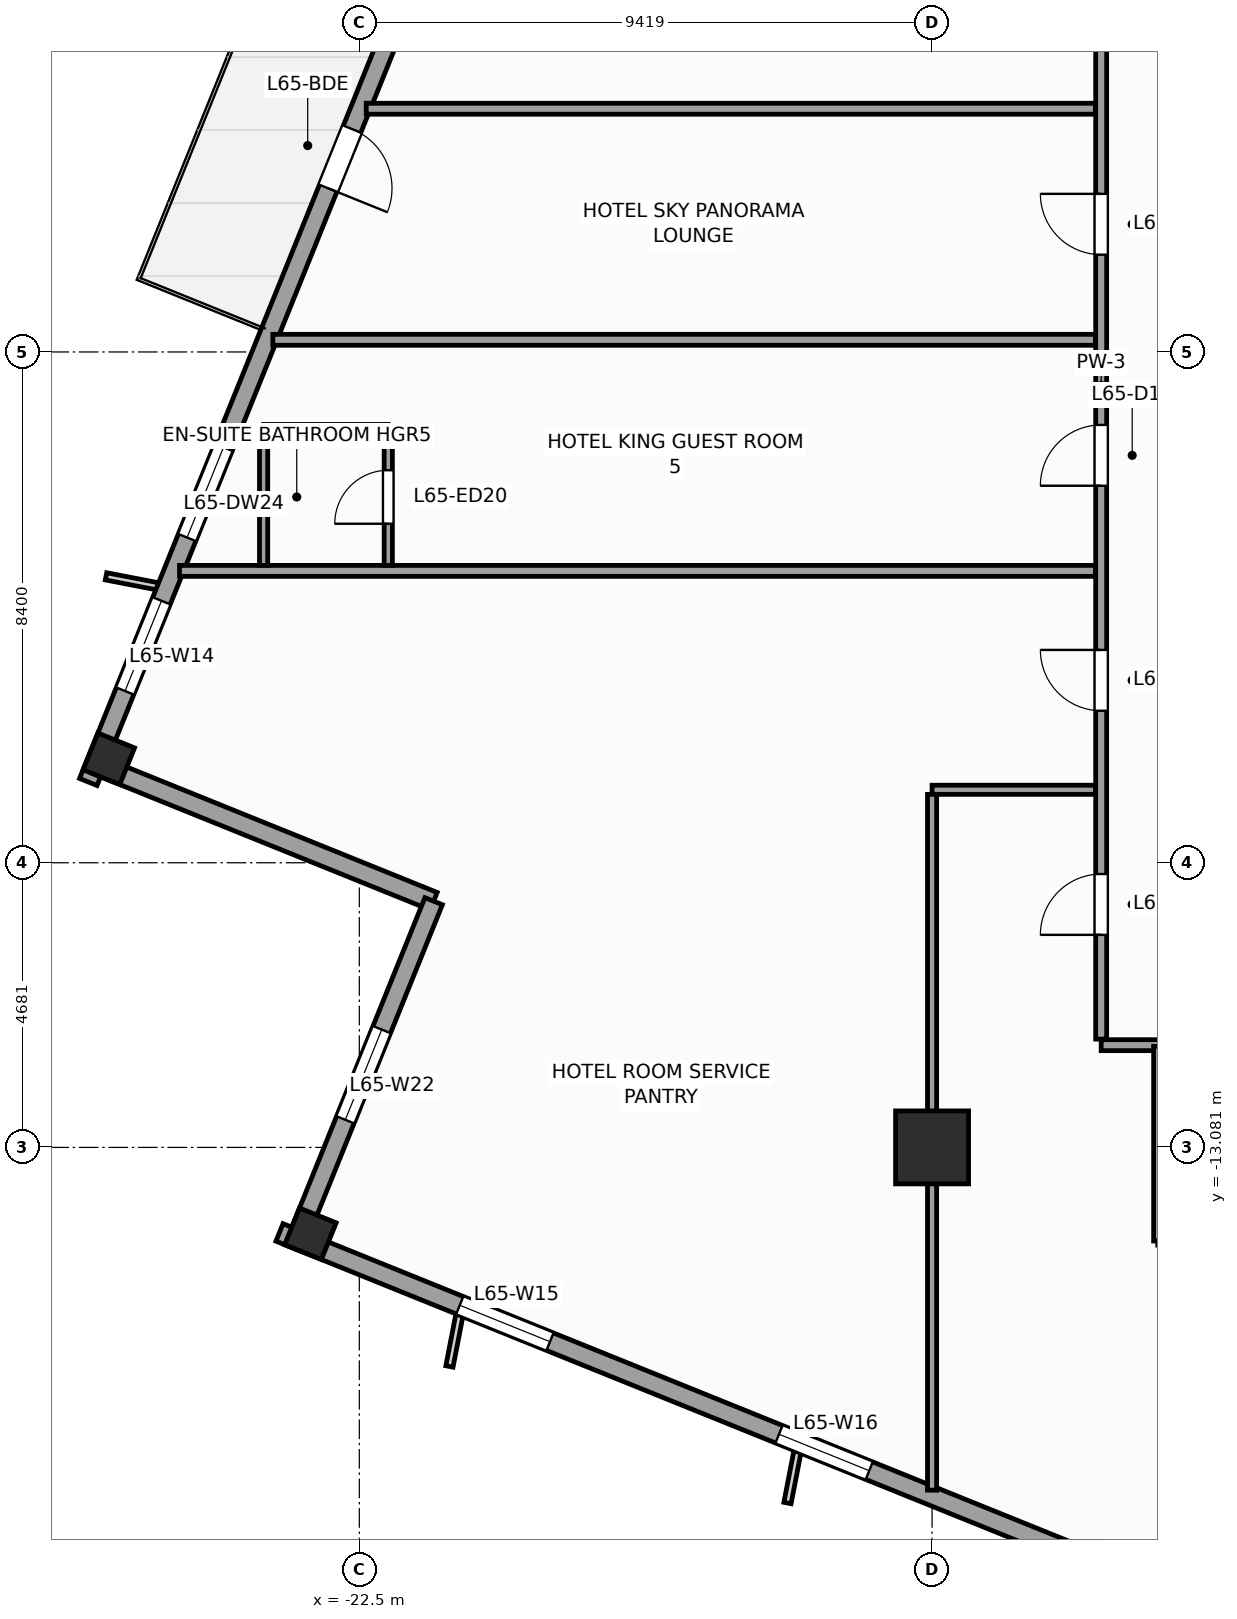
"""IFC4 building model, lengths in metres.
Left out: names, types, materials, properties, quantities, classifications, styles, units other than length and angle.
Written with IfcOpenShell. Run it as: python <this file> out.ifc"""

import sys

from ifc_helpers import new_model, si_unit, direction, frame, frame_2d, origin, origin_2d, place, context, subcontext, project, spatial, rectangle, extrude, source, transform, mapped, element, fill, save


model = new_model("IFC4")
c1 = context("Model", 3, precision=1e-05, world=origin(), true_north=direction((0.0, 1.0)))
c2 = subcontext(c1, "Body", "Model", "MODEL_VIEW")
j1 = project(units=[si_unit("LENGTHUNIT", "METRE"), si_unit("PLANEANGLEUNIT", "RADIAN")], contexts=[c1])
p1 = place(None, origin())
s1 = spatial("IfcSite", under=j1, at=p1, CompositionType="ELEMENT")
p2 = place(p1, origin())
s2 = spatial("IfcBuilding", under=s1, at=p2, CompositionType="ELEMENT")
p3 = place(p2, frame((0.0, 0.0, 268.8)))
s3 = spatial("IfcBuildingStorey", under=s2, at=p3, CompositionType="ELEMENT", Elevation=268.8)
m1 = source(origin(), c2, "Body", "SweptSolid", [
    extrude(rectangle(XDim=1.2, YDim=1.2, at=origin_2d()), origin(), (0.0, 0.0, 1.0), 3.6),
])
p4 = place(p3, frame((-13.081, -13.081, 0.0), z_axis=(0.0, 0.0, 1.0), x_axis=(1.0, 0.0, 0.0)))
e1 = element("IfcColumn", 1, at=p4, inside=s3, PredefinedType="COLUMN", context=c2, shape_type="MappedRepresentation", body=[
    mapped(m1, transform((0.0, 0.0, 0.0), scale=1.0)),
])
m2 = source(origin(), c2, "Body", "SweptSolid", [
    extrude(rectangle(XDim=0.65, YDim=0.65, at=origin_2d()), origin(), (0.0, 0.0, 1.0), 3.6),
])
for number, where, z_axis, x_axis in (
    (2, (-26.62, -6.69, 0.0), (0.0, 0.0, 1.0), (0.375, 0.927, 0.0)),
    (3, (-23.304, -14.501, 0.0), (0.0, 0.0, 1.0), (0.375, 0.927, 0.0)),
):
    element("IfcColumn", number, at=place(p3, frame(where, z_axis=z_axis, x_axis=x_axis)), inside=s3, PredefinedType="COLUMN", context=c2, shape_type="MappedRepresentation", body=[
        mapped(m2, transform((0.0, 0.0, 0.0), scale=1.0)),
    ])
p5 = place(p3, frame((-14.479, 23.813, 0.0), z_axis=(0.0, 0.0, 1.0), x_axis=(-0.374609557019, -0.927182657188, 0.0)))
e4 = element("IfcWall", 4, at=p5, inside=s3, PredefinedType="STANDARD", context=c2, shape_type="SweptSolid", body=[
    extrude(rectangle(XDim=33.31, YDim=0.31, at=frame_2d((16.655, 0.0))), origin(), (0.0, 0.0, 1.0), 2.75),
])
p6 = place(p5, frame((21.73, 0.0, 0.0)))
e5 = element("IfcOpeningElement", 5, at=p6, cuts=e4, PredefinedType="OPENING", context=c2, shape_type="SweptSolid", body=[
    extrude(rectangle(XDim=1.05, YDim=2.25, at=frame_2d((0.525, 1.125))), frame((0.0, 0.165, 0.0), z_axis=(0.0, -1.0, 0.0), x_axis=(1.0, 0.0, 0.0)), (0.0, 0.0, 1.0), 0.33),
])
p7 = place(p5, frame((3.197, 0.0, 0.47)))
e6 = element("IfcOpeningElement", 6, at=p7, cuts=e4, PredefinedType="OPENING", context=c2, shape_type="SweptSolid", body=[
    extrude(rectangle(XDim=1.6, YDim=2.1, at=frame_2d((0.8, 1.05))), frame((0.0, 0.165, 0.0), z_axis=(0.0, -1.0, 0.0), x_axis=(1.0, 0.0, 0.0)), (0.0, 0.0, 1.0), 0.33),
])
p8 = place(p5, frame((8.86, 0.0, 0.47)))
e7 = element("IfcOpeningElement", 7, at=p8, cuts=e4, PredefinedType="OPENING", context=c2, shape_type="SweptSolid", body=[
    extrude(rectangle(XDim=1.6, YDim=2.1, at=frame_2d((0.8, 1.05))), frame((0.0, 0.165, 0.0), z_axis=(0.0, -1.0, 0.0), x_axis=(1.0, 0.0, 0.0)), (0.0, 0.0, 1.0), 0.33),
])
p9 = place(p5, frame((14.439, 0.0, 0.47)))
e8 = element("IfcOpeningElement", 8, at=p9, cuts=e4, PredefinedType="OPENING", context=c2, shape_type="SweptSolid", body=[
    extrude(rectangle(XDim=1.6, YDim=2.1, at=frame_2d((0.8, 1.05))), frame((0.0, 0.165, 0.0), z_axis=(0.0, -1.0, 0.0), x_axis=(1.0, 0.0, 0.0)), (0.0, 0.0, 1.0), 0.33),
])
p10 = place(p5, frame((30.097, 0.0, 0.47)))
e9 = element("IfcOpeningElement", 9, at=p10, cuts=e4, PredefinedType="OPENING", context=c2, shape_type="SweptSolid", body=[
    extrude(rectangle(XDim=1.6, YDim=2.1, at=frame_2d((0.8, 1.05))), frame((0.0, 0.165, 0.0), z_axis=(0.0, -1.0, 0.0), x_axis=(1.0, 0.0, 0.0)), (0.0, 0.0, 1.0), 0.33),
])
p11 = place(p5, frame((27.374, 0.0, 0.47)))
e10 = element("IfcOpeningElement", 10, at=p11, cuts=e4, PredefinedType="OPENING", context=c2, shape_type="SweptSolid", body=[
    extrude(rectangle(XDim=1.6, YDim=2.1, at=frame_2d((0.8, 1.05))), frame((0.0, 0.165, 0.0), z_axis=(0.0, -1.0, 0.0), x_axis=(1.0, 0.0, 0.0)), (0.0, 0.0, 1.0), 0.33),
])
p12 = place(p3, frame((-26.841, -6.784, 0.0), z_axis=(0.0, 0.0, 1.0), x_axis=(0.927171722085, -0.374636620962, 0.0)))
e11 = element("IfcWall", 11, at=p12, inside=s3, PredefinedType="STANDARD", context=c2, shape_type="SweptSolid", body=[
    extrude(rectangle(XDim=6.0, YDim=0.31, at=frame_2d((3.0, 0.0))), origin(), (0.0, 0.0, 1.0), 2.65),
])
p13 = place(p3, frame((-21.278, -9.032, 0.0), z_axis=(0.0, 0.0, 1.0), x_axis=(-0.374602739196, -0.927185411764, 0.0)))
e12 = element("IfcWall", 12, at=p13, inside=s3, PredefinedType="STANDARD", context=c2, shape_type="SweptSolid", body=[
    extrude(rectangle(XDim=6.155, YDim=0.31, at=frame_2d((3.078, 0.0))), origin(), (0.0, 0.0, 1.0), 3.35),
])
p14 = place(p13, frame((2.278, 0.0, 0.47)))
e13 = element("IfcOpeningElement", 13, at=p14, cuts=e12, PredefinedType="OPENING", context=c2, shape_type="SweptSolid", body=[
    extrude(rectangle(XDim=1.6, YDim=2.1, at=frame_2d((0.8, 1.05))), frame((0.0, 0.165, 0.0), z_axis=(0.0, -1.0, 0.0), x_axis=(1.0, 0.0, 0.0)), (0.0, 0.0, 1.0), 0.33),
])
p15 = place(p3, frame((-23.813, -14.479, 0.0), z_axis=(0.0, 0.0, 1.0), x_axis=(0.927182657188, -0.374609557019, 0.0)))
e14 = element("IfcWall", 14, at=p15, inside=s3, PredefinedType="STANDARD", context=c2, shape_type="SweptSolid", body=[
    extrude(rectangle(XDim=33.31, YDim=0.31, at=frame_2d((16.655, 0.0))), origin(), (0.0, 0.0, 1.0), 2.75),
])
p16 = place(p15, frame((3.197, 0.0, 0.47)))
e15 = element("IfcOpeningElement", 15, at=p16, cuts=e14, PredefinedType="OPENING", context=c2, shape_type="SweptSolid", body=[
    extrude(rectangle(XDim=1.6, YDim=2.1, at=frame_2d((0.8, 1.05))), frame((0.0, 0.165, 0.0), z_axis=(0.0, -1.0, 0.0), x_axis=(1.0, 0.0, 0.0)), (0.0, 0.0, 1.0), 0.33),
])
p17 = place(p15, frame((8.86, 0.0, 0.47)))
e16 = element("IfcOpeningElement", 16, at=p17, cuts=e14, PredefinedType="OPENING", context=c2, shape_type="SweptSolid", body=[
    extrude(rectangle(XDim=1.6, YDim=2.1, at=frame_2d((0.8, 1.05))), frame((0.0, 0.165, 0.0), z_axis=(0.0, -1.0, 0.0), x_axis=(1.0, 0.0, 0.0)), (0.0, 0.0, 1.0), 0.33),
])
p18 = place(p15, frame((14.439, 0.0, 0.47)))
e17 = element("IfcOpeningElement", 17, at=p18, cuts=e14, PredefinedType="OPENING", context=c2, shape_type="SweptSolid", body=[
    extrude(rectangle(XDim=1.6, YDim=2.1, at=frame_2d((0.8, 1.05))), frame((0.0, 0.165, 0.0), z_axis=(0.0, -1.0, 0.0), x_axis=(1.0, 0.0, 0.0)), (0.0, 0.0, 1.0), 0.33),
])
p19 = place(p15, frame((22.601, 0.0, 0.47)))
e18 = element("IfcOpeningElement", 18, at=p19, cuts=e14, PredefinedType="OPENING", context=c2, shape_type="SweptSolid", body=[
    extrude(rectangle(XDim=1.6, YDim=2.1, at=frame_2d((0.8, 1.05))), frame((0.0, 0.165, 0.0), z_axis=(0.0, -1.0, 0.0), x_axis=(1.0, 0.0, 0.0)), (0.0, 0.0, 1.0), 0.33),
])
p20 = place(p15, frame((27.097, 0.0, 0.47)))
e19 = element("IfcOpeningElement", 19, at=p20, cuts=e14, PredefinedType="OPENING", context=c2, shape_type="SweptSolid", body=[
    extrude(rectangle(XDim=1.6, YDim=2.1, at=frame_2d((0.8, 1.05))), frame((0.0, 0.165, 0.0), z_axis=(0.0, -1.0, 0.0), x_axis=(1.0, 0.0, 0.0)), (0.0, 0.0, 1.0), 0.33),
])
p21 = place(p3, frame((-10.3, -11.4, 0.0), z_axis=(0.0, 0.0, 1.0), x_axis=(1.0, 0.0, 0.0)))
e20 = element("IfcWall", 20, at=p21, inside=s3, PredefinedType="PARTITIONING", context=c2, shape_type="SweptSolid", body=[
    extrude(rectangle(XDim=21.7, YDim=0.18, at=frame_2d((10.85, 0.0))), origin(), (0.0, 0.0, 1.0), 3.35),
])
p22 = place(p21, frame((1.605, 0.0, 0.0)))
e21 = element("IfcOpeningElement", 21, at=p22, cuts=e20, PredefinedType="OPENING", context=c2, shape_type="SweptSolid", body=[
    extrude(rectangle(XDim=0.95, YDim=2.1, at=frame_2d((0.475, 1.05))), frame((0.0, 0.1, 0.0), z_axis=(0.0, -1.0, 0.0), x_axis=(1.0, 0.0, 0.0)), (0.0, 0.0, 1.0), 0.2),
])
p23 = place(p21, frame((17.236, 0.0, 0.0)))
e22 = element("IfcOpeningElement", 22, at=p23, cuts=e20, PredefinedType="OPENING", context=c2, shape_type="SweptSolid", body=[
    extrude(rectangle(XDim=1.0, YDim=2.15, at=frame_2d((0.5, 1.075))), frame((0.0, 0.1, 0.0), z_axis=(0.0, -1.0, 0.0), x_axis=(1.0, 0.0, 0.0)), (0.0, 0.0, 1.0), 0.2),
])
p24 = place(p21, frame((9.8, 0.0, 0.0)))
e23 = element("IfcOpeningElement", 23, at=p24, cuts=e20, PredefinedType="OPENING", context=c2, shape_type="SweptSolid", body=[
    extrude(rectangle(XDim=1.0, YDim=2.15, at=frame_2d((0.5, 1.075))), frame((0.0, 0.1, 0.0), z_axis=(0.0, -1.0, 0.0), x_axis=(1.0, 0.0, 0.0)), (0.0, 0.0, 1.0), 0.2),
])
p25 = place(p3, frame((-10.3, -11.3, 0.0), z_axis=(0.0, 0.0, 1.0), x_axis=(0.0, 1.0, 0.0)))
e24 = element("IfcWall", 24, at=p25, inside=s3, PredefinedType="PARTITIONING", context=c2, shape_type="SweptSolid", body=[
    extrude(rectangle(XDim=21.5, YDim=0.18, at=frame_2d((10.75, 0.0))), origin(), (0.0, 0.0, 1.0), 3.35),
])
p26 = place(p25, frame((12.9, 0.0, 0.0)))
e25 = element("IfcOpeningElement", 25, at=p26, cuts=e24, PredefinedType="OPENING", context=c2, shape_type="SweptSolid", body=[
    extrude(rectangle(XDim=1.0, YDim=2.15, at=frame_2d((0.5, 1.075))), frame((0.0, 0.1, 0.0), z_axis=(0.0, -1.0, 0.0), x_axis=(1.0, 0.0, 0.0)), (0.0, 0.0, 1.0), 0.2),
])
p27 = place(p25, frame((17.736, 0.0, 0.0)))
e26 = element("IfcOpeningElement", 26, at=p27, cuts=e24, PredefinedType="OPENING", context=c2, shape_type="SweptSolid", body=[
    extrude(rectangle(XDim=1.0, YDim=2.15, at=frame_2d((0.5, 1.075))), frame((0.0, 0.1, 0.0), z_axis=(0.0, -1.0, 0.0), x_axis=(1.0, 0.0, 0.0)), (0.0, 0.0, 1.0), 0.2),
])
p28 = place(p25, frame((1.714, 0.0, 0.0)))
e27 = element("IfcOpeningElement", 27, at=p28, cuts=e24, PredefinedType="OPENING", context=c2, shape_type="SweptSolid", body=[
    extrude(rectangle(XDim=1.0, YDim=2.15, at=frame_2d((0.5, 1.075))), frame((0.0, 0.1, 0.0), z_axis=(0.0, -1.0, 0.0), x_axis=(1.0, 0.0, 0.0)), (0.0, 0.0, 1.0), 0.2),
])
p29 = place(p25, frame((5.4, 0.0, 0.0)))
e28 = element("IfcOpeningElement", 28, at=p29, cuts=e24, PredefinedType="OPENING", context=c2, shape_type="SweptSolid", body=[
    extrude(rectangle(XDim=1.0, YDim=2.15, at=frame_2d((0.5, 1.075))), frame((0.0, 0.1, 0.0), z_axis=(0.0, -1.0, 0.0), x_axis=(1.0, 0.0, 0.0)), (0.0, 0.0, 1.0), 0.2),
])
p30 = place(p25, frame((9.1, 0.0, 0.0)))
e29 = element("IfcOpeningElement", 29, at=p30, cuts=e24, PredefinedType="OPENING", context=c2, shape_type="SweptSolid", body=[
    extrude(rectangle(XDim=1.0, YDim=2.15, at=frame_2d((0.5, 1.075))), frame((0.0, 0.1, 0.0), z_axis=(0.0, -1.0, 0.0), x_axis=(1.0, 0.0, 0.0)), (0.0, 0.0, 1.0), 0.2),
])
p31 = place(p3, frame((-10.395, -3.6, 0.0), z_axis=(0.0, 0.0, 1.0), x_axis=(-1.0, 0.0, 0.0)))
e30 = element("IfcWall", 30, at=p31, inside=s3, PredefinedType="PARTITIONING", context=c2, shape_type="SweptSolid", body=[
    extrude(rectangle(XDim=15.062, YDim=0.18, at=frame_2d((7.531, 0.0))), origin(), (0.0, 0.0, 1.0), 3.35),
])
p32 = place(p3, frame((-10.395, 0.2, 0.0), z_axis=(0.0, 0.0, 1.0), x_axis=(-1.0, 0.0, 0.0)))
e31 = element("IfcWall", 31, at=p32, inside=s3, PredefinedType="PARTITIONING", context=c2, shape_type="SweptSolid", body=[
    extrude(rectangle(XDim=13.527, YDim=0.18, at=frame_2d((6.763, 0.0))), origin(), (0.0, 0.0, 1.0), 3.35),
])
p33 = place(p3, frame((-10.395, 4.0, 0.0), z_axis=(0.0, 0.0, 1.0), x_axis=(-1.0, 0.0, 0.0)))
e32 = element("IfcWall", 32, at=p33, inside=s3, PredefinedType="PARTITIONING", context=c2, shape_type="SweptSolid", body=[
    extrude(rectangle(XDim=11.992, YDim=0.18, at=frame_2d((5.996, 0.0))), origin(), (0.0, 0.0, 1.0), 3.35),
])
p34 = place(p3, frame((-10.395, -7.2, 0.0), z_axis=(0.0, 0.0, 1.0), x_axis=(-1.0, 0.0, 0.0)))
e33 = element("IfcWall", 33, at=p34, inside=s3, PredefinedType="PARTITIONING", context=c2, shape_type="SweptSolid", body=[
    extrude(rectangle(XDim=2.686, YDim=0.15, at=frame_2d((1.343, 0.0))), origin(), (0.0, 0.0, 1.0), 3.35),
])
p35 = place(p3, frame((-13.081, -7.275, 0.0), z_axis=(0.0, 0.0, 1.0), x_axis=(0.0, -1.0, 0.0)))
e34 = element("IfcWall", 34, at=p35, inside=s3, PredefinedType="PARTITIONING", context=c2, shape_type="SweptSolid", body=[
    extrude(rectangle(XDim=11.443, YDim=0.15, at=frame_2d((5.721, 0.0))), origin(), (0.0, 0.0, 1.0), 2.45),
])
p36 = place(p3, frame((-9.37, -14.62, 0.0), z_axis=(0.0, 0.0, 1.0), x_axis=(0.0, 1.0, 0.0)))
e35 = element("IfcWall", 35, at=p36, inside=s3, PredefinedType="PARTITIONING", context=c2, shape_type="SweptSolid", body=[
    extrude(rectangle(XDim=3.2, YDim=0.135, at=frame_2d((1.6, 0.0))), origin(), (0.0, 0.0, 1.0), 3.35),
])
p37 = place(p3, frame((-22.024, -3.51, 0.0), z_axis=(0.0, 0.0, 1.0), x_axis=(0.0, 1.0, 0.0)))
e36 = element("IfcWall", 36, at=p37, inside=s3, PredefinedType="PARTITIONING", context=c2, shape_type="SweptSolid", body=[
    extrude(rectangle(XDim=2.25, YDim=0.135, at=frame_2d((1.125, 0.0))), origin(), (0.0, 0.0, 1.0), 3.35),
])
p38 = place(p37, frame((0.685, 0.0, 0.0)))
e37 = element("IfcOpeningElement", 37, at=p38, cuts=e36, PredefinedType="OPENING", context=c2, shape_type="SweptSolid", body=[
    extrude(rectangle(XDim=0.88, YDim=2.1, at=frame_2d((0.44, 1.05))), frame((0.0, 0.078, 0.0), z_axis=(0.0, -1.0, 0.0), x_axis=(1.0, 0.0, 0.0)), (0.0, 0.0, 1.0), 0.155),
])
p39 = place(p3, frame((-24.074, -1.26, 0.0), z_axis=(0.0, 0.0, 1.0), x_axis=(1.0, 0.0, 0.0)))
e38 = element("IfcWall", 38, at=p39, inside=s3, PredefinedType="PARTITIONING", context=c2, shape_type="SweptSolid", body=[
    extrude(rectangle(XDim=2.05, YDim=0.135, at=frame_2d((1.025, 0.0))), origin(), (0.0, 0.0, 1.0), 3.35),
])
p40 = place(p3, frame((-24.074, -3.51, 0.0), z_axis=(0.0, 0.0, 1.0), x_axis=(0.0, 1.0, 0.0)))
e39 = element("IfcWall", 39, at=p40, inside=s3, PredefinedType="PARTITIONING", context=c2, shape_type="SweptSolid", body=[
    extrude(rectangle(XDim=2.25, YDim=0.135, at=frame_2d((1.125, 0.0))), origin(), (0.0, 0.0, 1.0), 3.35),
])
m3 = source(origin(), c2, "Body", "SweptSolid", [
    extrude(rectangle(XDim=1.05, YDim=2.25, at=frame_2d((0.525, 1.125))), frame((0.0, 0.025, 0.0), z_axis=(0.0, -1.0, 0.0), x_axis=(1.0, 0.0, 0.0)), (0.0, 0.0, 1.0), 0.05),
])
p41 = place(p6, origin())
e40 = element("IfcDoor", 40, at=p41, inside=s3, OperationType="SINGLE_SWING_RIGHT", PredefinedType="DOOR", context=c2, shape_type="MappedRepresentation", body=[
    mapped(m3, transform((0.0, 0.0, 0.0), scale=1.0)),
])
fill(e5, e40)
m4 = source(origin(), c2, "Body", "SweptSolid", [
    extrude(rectangle(XDim=1.6, YDim=2.1, at=frame_2d((0.8, 1.05))), frame((0.0, 0.03, 0.0), z_axis=(0.0, -1.0, 0.0), x_axis=(1.0, 0.0, 0.0)), (0.0, 0.0, 1.0), 0.06),
])
p42 = place(p10, origin())
e41 = element("IfcWindow", 41, at=p42, inside=s3, PartitioningType="SINGLE_PANEL", PredefinedType="WINDOW", context=c2, shape_type="MappedRepresentation", body=[
    mapped(m4, transform((0.0, 0.0, 0.0), scale=1.0)),
])
fill(e9, e41)
p43 = place(p16, origin())
e42 = element("IfcWindow", 42, at=p43, inside=s3, PartitioningType="SINGLE_PANEL", PredefinedType="WINDOW", context=c2, shape_type="MappedRepresentation", body=[
    mapped(m4, transform((0.0, 0.0, 0.0), scale=1.0)),
])
fill(e15, e42)
p44 = place(p17, origin())
e43 = element("IfcWindow", 43, at=p44, inside=s3, PartitioningType="SINGLE_PANEL", PredefinedType="WINDOW", context=c2, shape_type="MappedRepresentation", body=[
    mapped(m4, transform((0.0, 0.0, 0.0), scale=1.0)),
])
fill(e16, e43)
p45 = place(p14, origin())
e44 = element("IfcWindow", 44, at=p45, inside=s3, PartitioningType="SINGLE_PANEL", PredefinedType="WINDOW", context=c2, shape_type="MappedRepresentation", body=[
    mapped(m4, transform((0.0, 0.0, 0.0), scale=1.0)),
])
fill(e13, e44)
m5 = source(origin(), c2, "Body", "SweptSolid", [
    extrude(rectangle(XDim=1.0, YDim=2.15, at=frame_2d((0.5, 1.075))), frame((0.0, 0.025, 0.0), z_axis=(0.0, -1.0, 0.0), x_axis=(1.0, 0.0, 0.0)), (0.0, 0.0, 1.0), 0.05),
])
p46 = place(p26, origin())
e45 = element("IfcDoor", 45, at=p46, inside=s3, OperationType="SINGLE_SWING_RIGHT", PredefinedType="DOOR", context=c2, shape_type="MappedRepresentation", body=[
    mapped(m5, transform((0.0, 0.0, 0.0), scale=1.0)),
])
fill(e25, e45)
p47 = place(p28, origin())
e46 = element("IfcDoor", 46, at=p47, inside=s3, OperationType="SINGLE_SWING_LEFT", PredefinedType="DOOR", context=c2, shape_type="MappedRepresentation", body=[
    mapped(m5, transform((0.0, 0.0, 0.0), scale=1.0)),
])
fill(e27, e46)
p48 = place(p29, origin())
e47 = element("IfcDoor", 47, at=p48, inside=s3, OperationType="SINGLE_SWING_RIGHT", PredefinedType="DOOR", context=c2, shape_type="MappedRepresentation", body=[
    mapped(m5, transform((0.0, 0.0, 0.0), scale=1.0)),
])
fill(e28, e47)
p49 = place(p30, origin())
e48 = element("IfcDoor", 48, at=p49, inside=s3, OperationType="SINGLE_SWING_LEFT", PredefinedType="DOOR", context=c2, shape_type="MappedRepresentation", body=[
    mapped(m5, transform((0.0, 0.0, 0.0), scale=1.0)),
])
fill(e29, e48)
m6 = source(origin(), c2, "Body", "SweptSolid", [
    extrude(rectangle(XDim=0.88, YDim=2.1, at=frame_2d((0.44, 1.05))), frame((0.0, 0.025, 0.0), z_axis=(0.0, -1.0, 0.0), x_axis=(1.0, 0.0, 0.0)), (0.0, 0.0, 1.0), 0.05),
])
p50 = place(p38, origin())
e49 = element("IfcDoor", 49, at=p50, inside=s3, OperationType="SINGLE_SWING_LEFT", PredefinedType="DOOR", context=c2, shape_type="MappedRepresentation", body=[
    mapped(m6, transform((0.0, 0.0, 0.0), scale=1.0)),
])
fill(e37, e49)
p51 = place(p11, origin())
e50 = element("IfcWindow", 50, at=p51, inside=s3, PartitioningType="SINGLE_PANEL", PredefinedType="WINDOW", context=c2, shape_type="MappedRepresentation", body=[
    mapped(m4, transform((0.0, 0.0, 0.0), scale=1.0)),
])
fill(e10, e50)
save(model, sys.argv[1])
